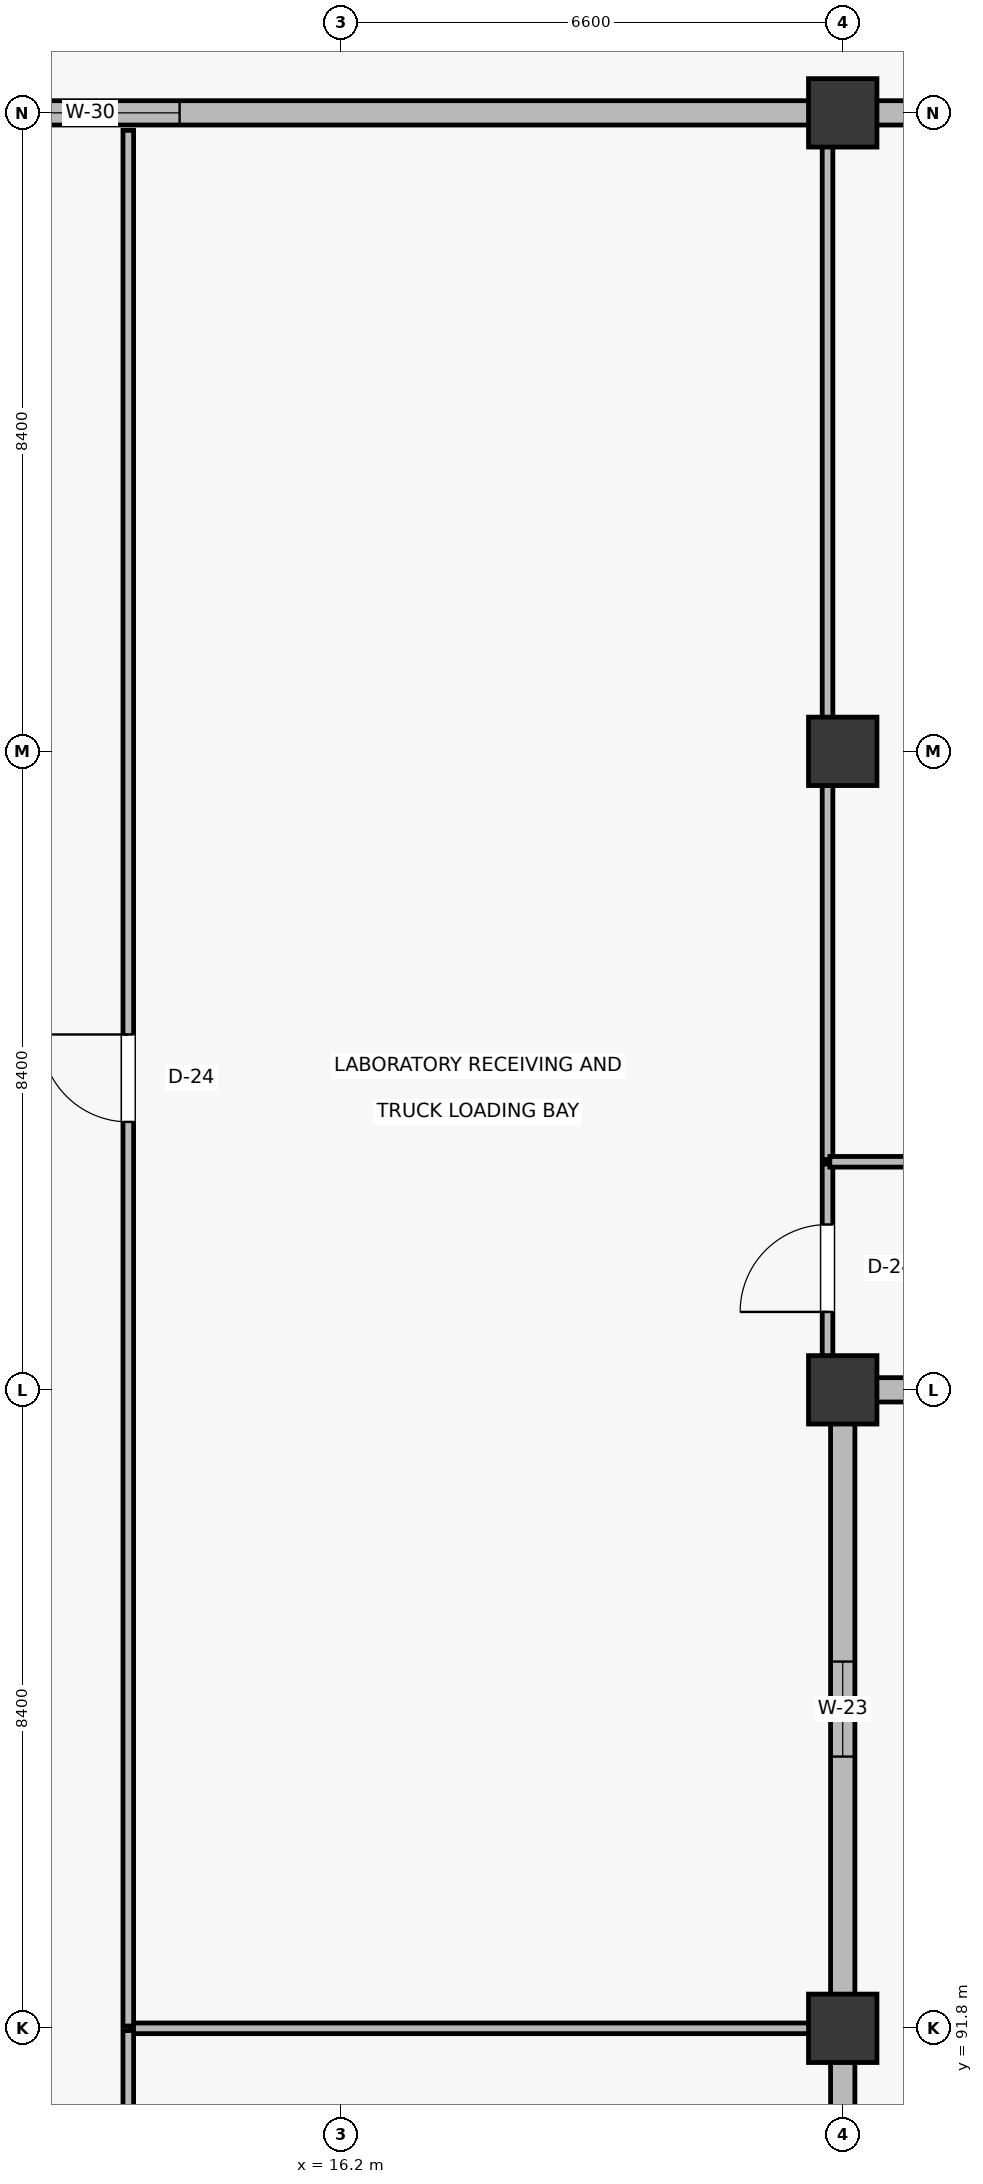
"""IFC4 building model, lengths in metres.
Left out: names, types, materials, properties, quantities, classifications, styles, units other than length and angle.
Written with IfcOpenShell. Run it as: python <this file> out.ifc"""

import sys

from ifc_helpers import new_model, si_unit, direction, frame, frame_2d, origin, origin_2d, place, context, subcontext, project, spatial, rectangle, extrude, element, fill, save


model = new_model("IFC4")
c1 = context("Model", 3, precision=1e-05, world=origin(), true_north=direction((0.0, 1.0)))
c2 = subcontext(c1, "Body", "Model", "MODEL_VIEW")
j1 = project(units=[si_unit("LENGTHUNIT", "METRE"), si_unit("PLANEANGLEUNIT", "RADIAN")], contexts=[c1])
p1 = place(None, origin())
s1 = spatial("IfcSite", under=j1, at=p1, CompositionType="ELEMENT")
p2 = place(p1, origin())
s2 = spatial("IfcBuilding", under=s1, at=p2, CompositionType="ELEMENT")
p3 = place(p2, origin())
s3 = spatial("IfcBuildingStorey", under=s2, at=p3, CompositionType="ELEMENT", Elevation=0.0)
for number, where, z_axis, x_axis in (
    (1, (22.8, 91.8, 0.0), (0.0, 0.0, 1.0), (1.0, 0.0, 0.0)),
    (2, (22.8, 100.2, 0.0), (0.0, 0.0, 1.0), (1.0, 0.0, 0.0)),
    (3, (22.8, 108.6, 0.0), (0.0, 0.0, 1.0), (1.0, 0.0, 0.0)),
    (4, (22.8, 117.0, 0.0), (0.0, 0.0, 1.0), (1.0, 0.0, 0.0)),
):
    element("IfcColumn", number, at=place(p3, frame(where, z_axis=z_axis, x_axis=x_axis)), inside=s3, PredefinedType="COLUMN", context=c2, shape_type="SweptSolid", body=[
        extrude(rectangle(XDim=0.9, YDim=0.9, at=origin_2d()), origin(), (0.0, 0.0, 1.0), 5.4),
    ])
p4 = place(p3, frame((22.8, 83.835, 0.0), z_axis=(0.0, 0.0, 1.0), x_axis=(0.0, 1.0, 0.0)))
e5 = element("IfcWall", 5, at=p4, inside=s3, PredefinedType="SOLIDWALL", context=c2, shape_type="SweptSolid", body=[
    extrude(rectangle(XDim=7.53, YDim=0.32, at=frame_2d((3.765, 0.0))), origin(), (0.0, 0.0, 1.0), 4.425),
])
p5 = place(p4, frame((3.215, 0.0, 0.9)))
e6 = element("IfcOpeningElement", 6, at=p5, cuts=e5, PredefinedType="OPENING", context=c2, shape_type="SweptSolid", body=[
    extrude(rectangle(XDim=1.1, YDim=1.75, at=frame_2d((0.55, 0.875))), frame((0.0, 0.17, 0.0), z_axis=(0.0, -1.0, 0.0), x_axis=(1.0, 0.0, 0.0)), (0.0, 0.0, 1.0), 0.34),
])
p6 = place(p3, frame((22.8, 92.235, 0.0), z_axis=(0.0, 0.0, 1.0), x_axis=(0.0, 1.0, 0.0)))
e7 = element("IfcWall", 7, at=p6, inside=s3, PredefinedType="SOLIDWALL", context=c2, shape_type="SweptSolid", body=[
    extrude(rectangle(XDim=7.53, YDim=0.32, at=frame_2d((3.765, 0.0))), origin(), (0.0, 0.0, 1.0), 4.425),
])
p7 = place(p6, frame((3.14, 0.0, 0.9)))
e8 = element("IfcOpeningElement", 8, at=p7, cuts=e7, PredefinedType="OPENING", context=c2, shape_type="SweptSolid", body=[
    extrude(rectangle(XDim=1.25, YDim=1.8, at=frame_2d((0.625, 0.9))), frame((0.0, 0.17, 0.0), z_axis=(0.0, -1.0, 0.0), x_axis=(1.0, 0.0, 0.0)), (0.0, 0.0, 1.0), 0.34),
])
p8 = place(p3, frame((3.435, 117.0, 0.0), z_axis=(0.0, 0.0, 1.0), x_axis=(1.0, 0.0, 0.0)))
e9 = element("IfcWall", 9, at=p8, inside=s3, PredefinedType="SOLIDWALL", context=c2, shape_type="SweptSolid", body=[
    extrude(rectangle(XDim=18.93, YDim=0.32, at=frame_2d((9.465, 0.0))), origin(), (0.0, 0.0, 1.0), 4.375),
])
p9 = place(p8, frame((8.29, 0.0, 0.95)))
e10 = element("IfcOpeningElement", 10, at=p9, cuts=e9, PredefinedType="OPENING", context=c2, shape_type="SweptSolid", body=[
    extrude(rectangle(XDim=2.35, YDim=1.9, at=frame_2d((1.175, 0.95))), frame((0.0, 0.17, 0.0), z_axis=(0.0, -1.0, 0.0), x_axis=(1.0, 0.0, 0.0)), (0.0, 0.0, 1.0), 0.34),
])
p10 = place(p3, frame((23.235, 117.0, 0.0), z_axis=(0.0, 0.0, 1.0), x_axis=(1.0, 0.0, 0.0)))
e11 = element("IfcWall", 11, at=p10, inside=s3, PredefinedType="SOLIDWALL", context=c2, shape_type="SweptSolid", body=[
    extrude(rectangle(XDim=5.83, YDim=0.32, at=frame_2d((2.915, 0.0))), origin(), (0.0, 0.0, 1.0), 4.375),
])
p11 = place(p10, frame((1.665, 0.0, 0.9)))
e12 = element("IfcOpeningElement", 12, at=p11, cuts=e11, PredefinedType="OPENING", context=c2, shape_type="SweptSolid", body=[
    extrude(rectangle(XDim=2.5, YDim=1.95, at=frame_2d((1.25, 0.975))), frame((0.0, 0.17, 0.0), z_axis=(0.0, -1.0, 0.0), x_axis=(1.0, 0.0, 0.0)), (0.0, 0.0, 1.0), 0.34),
])
p12 = place(p3, frame((23.235, 100.2, 0.0), z_axis=(0.0, 0.0, 1.0), x_axis=(1.0, 0.0, 0.0)))
e13 = element("IfcWall", 13, at=p12, inside=s3, PredefinedType="SOLIDWALL", context=c2, shape_type="SweptSolid", body=[
    extrude(rectangle(XDim=5.83, YDim=0.32, at=frame_2d((2.915, 0.0))), origin(), (0.0, 0.0, 1.0), 4.325),
])
p13 = place(p12, frame((2.04, 0.0, 0.9)))
e14 = element("IfcOpeningElement", 14, at=p13, cuts=e13, PredefinedType="OPENING", context=c2, shape_type="SweptSolid", body=[
    extrude(rectangle(XDim=1.75, YDim=1.6, at=frame_2d((0.875, 0.8))), frame((0.0, 0.17, 0.0), z_axis=(0.0, -1.0, 0.0), x_axis=(1.0, 0.0, 0.0)), (0.0, 0.0, 1.0), 0.34),
])
p14 = place(p3, frame((13.43, 91.8, 0.0), z_axis=(0.0, 0.0, 1.0), x_axis=(1.0, 0.0, 0.0)))
e15 = element("IfcWall", 15, at=p14, inside=s3, PredefinedType="PARTITIONING", context=c2, shape_type="SweptSolid", body=[
    extrude(rectangle(XDim=9.14, YDim=0.14, at=frame_2d((4.57, 0.0))), origin(), (0.0, 0.0, 1.0), 4.275),
])
p15 = place(p3, frame((13.4, 73.853, 0.0), z_axis=(0.0, 0.0, 1.0), x_axis=(0.0, 1.0, 0.0)))
e16 = element("IfcWall", 16, at=p15, inside=s3, PredefinedType="PARTITIONING", context=c2, shape_type="SweptSolid", body=[
    extrude(rectangle(XDim=17.917, YDim=0.14, at=frame_2d((8.958, 0.0))), origin(), (0.0, 0.0, 1.0), 4.275),
])
p16 = place(p15, frame((8.383, 0.0, 0.0)))
e17 = element("IfcOpeningElement", 17, at=p16, cuts=e16, PredefinedType="OPENING", context=c2, shape_type="SweptSolid", body=[
    extrude(rectangle(XDim=1.15, YDim=2.15, at=frame_2d((0.575, 1.075))), frame((0.0, 0.08, 0.0), z_axis=(0.0, -1.0, 0.0), x_axis=(1.0, 0.0, 0.0)), (0.0, 0.0, 1.0), 0.16),
])
p17 = place(p3, frame((13.4, 91.83, 0.0), z_axis=(0.0, 0.0, 1.0), x_axis=(0.0, 1.0, 0.0)))
e18 = element("IfcWall", 18, at=p17, inside=s3, PredefinedType="PARTITIONING", context=c2, shape_type="SweptSolid", body=[
    extrude(rectangle(XDim=24.94, YDim=0.14, at=frame_2d((12.47, 0.0))), origin(), (0.0, 0.0, 1.0), 4.215),
])
p18 = place(p17, frame((11.895, 0.0, 0.0)))
e19 = element("IfcOpeningElement", 19, at=p18, cuts=e18, PredefinedType="OPENING", context=c2, shape_type="SweptSolid", body=[
    extrude(rectangle(XDim=1.15, YDim=2.15, at=frame_2d((0.575, 1.075))), frame((0.0, 0.08, 0.0), z_axis=(0.0, -1.0, 0.0), x_axis=(1.0, 0.0, 0.0)), (0.0, 0.0, 1.0), 0.16),
])
p19 = place(p3, frame((22.6, 103.23, 0.0), z_axis=(0.0, 0.0, 1.0), x_axis=(0.0, 1.0, 0.0)))
e20 = element("IfcWall", 20, at=p19, inside=s3, PredefinedType="PARTITIONING", context=c2, shape_type="SweptSolid", body=[
    extrude(rectangle(XDim=13.54, YDim=0.14, at=frame_2d((6.77, 0.0))), origin(), (0.0, 0.0, 1.0), 4.425),
])
p20 = place(p3, frame((22.6, 100.43, 0.0), z_axis=(0.0, 0.0, 1.0), x_axis=(0.0, 1.0, 0.0)))
e21 = element("IfcWall", 21, at=p20, inside=s3, PredefinedType="PARTITIONING", context=c2, shape_type="SweptSolid", body=[
    extrude(rectangle(XDim=2.74, YDim=0.14, at=frame_2d((1.37, 0.0))), origin(), (0.0, 0.0, 1.0), 4.425),
])
p21 = place(p20, frame((0.795, 0.0, 0.0)))
e22 = element("IfcOpeningElement", 22, at=p21, cuts=e21, PredefinedType="OPENING", context=c2, shape_type="SweptSolid", body=[
    extrude(rectangle(XDim=1.15, YDim=2.15, at=frame_2d((0.575, 1.075))), frame((0.0, 0.08, 0.0), z_axis=(0.0, -1.0, 0.0), x_axis=(1.0, 0.0, 0.0)), (0.0, 0.0, 1.0), 0.16),
])
p22 = place(p3, frame((22.63, 103.2, 0.0), z_axis=(0.0, 0.0, 1.0), x_axis=(1.0, 0.0, 0.0)))
e23 = element("IfcWall", 23, at=p22, inside=s3, PredefinedType="PARTITIONING", context=c2, shape_type="SweptSolid", body=[
    extrude(rectangle(XDim=29.14, YDim=0.14, at=frame_2d((14.57, 0.0))), origin(), (0.0, 0.0, 1.0), 4.425),
])
p23 = place(p22, frame((13.995, 0.0, 0.0)))
e24 = element("IfcOpeningElement", 24, at=p23, cuts=e23, PredefinedType="OPENING", context=c2, shape_type="SweptSolid", body=[
    extrude(rectangle(XDim=1.15, YDim=2.15, at=frame_2d((0.575, 1.075))), frame((0.0, 0.08, 0.0), z_axis=(0.0, -1.0, 0.0), x_axis=(1.0, 0.0, 0.0)), (0.0, 0.0, 1.0), 0.16),
])
p24 = place(p7, frame((1.25, 0.0, 0.0), z_axis=(0.0, 0.0, 1.0), x_axis=(-1.0, 0.0, 0.0)))
e25 = element("IfcWindow", 25, at=p24, inside=s3, PartitioningType="DOUBLE_PANEL_VERTICAL", PredefinedType="WINDOW", context=c2, shape_type="SweptSolid", body=[
    extrude(rectangle(XDim=1.25, YDim=1.8, at=frame_2d((0.625, 0.9))), frame((0.0, 0.03, 0.0), z_axis=(0.0, -1.0, 0.0), x_axis=(1.0, 0.0, 0.0)), (0.0, 0.0, 1.0), 0.06),
])
fill(e8, e25)
p25 = place(p9, origin())
e26 = element("IfcWindow", 26, at=p25, inside=s3, PartitioningType="DOUBLE_PANEL_VERTICAL", PredefinedType="WINDOW", context=c2, shape_type="SweptSolid", body=[
    extrude(rectangle(XDim=2.35, YDim=1.9, at=frame_2d((1.175, 0.95))), frame((0.0, 0.03, 0.0), z_axis=(0.0, -1.0, 0.0), x_axis=(1.0, 0.0, 0.0)), (0.0, 0.0, 1.0), 0.06),
])
fill(e10, e26)
p26 = place(p18, origin())
e27 = element("IfcDoor", 27, at=p26, inside=s3, OperationType="SINGLE_SWING_RIGHT", PredefinedType="DOOR", context=c2, shape_type="SweptSolid", body=[
    extrude(rectangle(XDim=1.15, YDim=2.15, at=frame_2d((0.575, 1.075))), frame((0.0, 0.025, 0.0), z_axis=(0.0, -1.0, 0.0), x_axis=(1.0, 0.0, 0.0)), (0.0, 0.0, 1.0), 0.05),
])
fill(e19, e27)
p27 = place(p21, origin())
e28 = element("IfcDoor", 28, at=p27, inside=s3, OperationType="SINGLE_SWING_LEFT", PredefinedType="DOOR", context=c2, shape_type="SweptSolid", body=[
    extrude(rectangle(XDim=1.15, YDim=2.15, at=frame_2d((0.575, 1.075))), frame((0.0, 0.025, 0.0), z_axis=(0.0, -1.0, 0.0), x_axis=(1.0, 0.0, 0.0)), (0.0, 0.0, 1.0), 0.05),
])
fill(e22, e28)
save(model, sys.argv[1])
